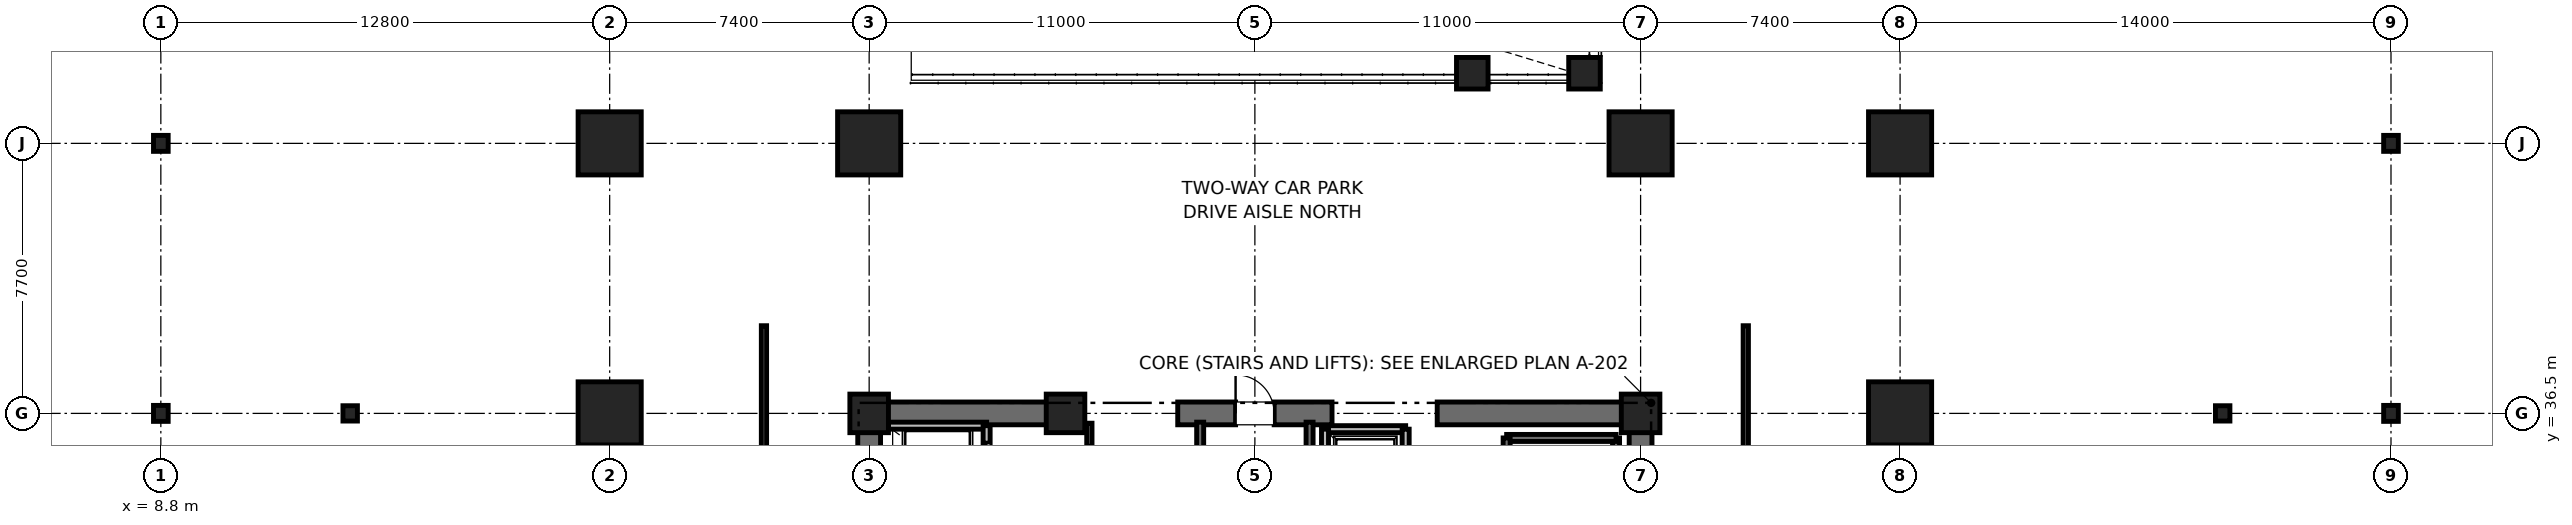
"""IFC4 building model, lengths in metres.
Left out: names, types, materials, properties, quantities, classifications, styles, units other than length and angle.
Written with IfcOpenShell. Run it as: python <this file> out.ifc"""

import sys

from ifc_helpers import new_model, si_unit, direction, frame, frame_2d, origin, origin_2d, place, context, subcontext, project, spatial, rectangle, i_section, extrude, element, fill, save


model = new_model("IFC4")
c1 = context("Model", 3, precision=1e-05, world=origin(), true_north=direction((0.0, 1.0)))
c2 = subcontext(c1, "Body", "Model", "MODEL_VIEW")
j1 = project(units=[si_unit("LENGTHUNIT", "METRE"), si_unit("PLANEANGLEUNIT", "RADIAN")], contexts=[c1])
p1 = place(None, origin())
s1 = spatial("IfcSite", under=j1, at=p1, CompositionType="ELEMENT")
p2 = place(p1, origin())
s2 = spatial("IfcBuilding", under=s1, at=p2, CompositionType="ELEMENT")
p3 = place(p2, frame((0.0, 0.0, -4.5)))
s3 = spatial("IfcBuildingStorey", under=s2, at=p3, CompositionType="ELEMENT", Elevation=-4.5)
for number, where, z_axis, x_axis in (
    (1, (29.0, 44.2, 0.0), (0.0, 0.0, 1.0), (1.0, 0.0, 0.0)),
    (2, (51.0, 44.2, 0.0), (0.0, 0.0, 1.0), (1.0, 0.0, 0.0)),
    (3, (21.6, 36.5, 0.0), (0.0, 0.0, 1.0), (1.0, 0.0, 0.0)),
    (4, (58.4, 36.5, 0.0), (0.0, 0.0, 1.0), (1.0, 0.0, 0.0)),
    (5, (21.6, 44.2, 0.0), (0.0, 0.0, 1.0), (1.0, 0.0, 0.0)),
    (6, (58.4, 44.2, 0.0), (0.0, 0.0, 1.0), (1.0, 0.0, 0.0)),
):
    element("IfcColumn", number, at=place(p3, frame(where, z_axis=z_axis, x_axis=x_axis)), inside=s3, PredefinedType="COLUMN", context=c2, shape_type="SweptSolid", body=[
        extrude(rectangle(XDim=1.8, YDim=1.8, at=origin_2d()), origin(), (0.0, 0.0, 1.0), 4.5),
    ])
for number, where, z_axis, x_axis in (
    (7, (14.2, 36.5, 0.0), (0.0, 0.0, 1.0), (1.0, 0.0, 0.0)),
    (8, (67.6, 36.5, 0.0), (0.0, 0.0, 1.0), (1.0, 0.0, 0.0)),
):
    element("IfcColumn", number, at=place(p3, frame(where, z_axis=z_axis, x_axis=x_axis)), inside=s3, PredefinedType="COLUMN", context=c2, shape_type="SweptSolid", body=[
        extrude(i_section(OverallWidth=0.412, OverallDepth=0.437, WebThickness=0.036, FlangeThickness=0.058, FilletRadius=0.015, at=origin_2d()), origin(), (0.0, 0.0, 1.0), 4.5),
    ])
for number, where, z_axis, x_axis in (
    (9, (29.0, 36.5, 0.0), (0.0, 0.0, 1.0), (1.0, 0.0, 0.0)),
    (10, (51.0, 36.5, 0.0), (0.0, 0.0, 1.0), (1.0, 0.0, 0.0)),
    (11, (34.6, 36.5, 0.0), (0.0, 0.0, 1.0), (1.0, 0.0, 0.0)),
):
    element("IfcColumn", number, at=place(p3, frame(where, z_axis=z_axis, x_axis=x_axis)), inside=s3, PredefinedType="PILASTER", context=c2, shape_type="SweptSolid", body=[
        extrude(rectangle(XDim=1.1, YDim=1.1, at=origin_2d()), origin(), (0.0, 0.0, 1.0), 4.5),
    ])
for number, where, z_axis, x_axis in (
    (12, (8.8, 36.5, 0.0), (0.0, 0.0, 1.0), (1.0, 0.0, 0.0)),
    (13, (8.8, 44.2, 0.0), (0.0, 0.0, 1.0), (1.0, 0.0, 0.0)),
    (14, (72.4, 36.5, 0.0), (0.0, 0.0, 1.0), (1.0, 0.0, 0.0)),
    (15, (72.4, 44.2, 0.0), (0.0, 0.0, 1.0), (1.0, 0.0, 0.0)),
):
    element("IfcColumn", number, at=place(p3, frame(where, z_axis=z_axis, x_axis=x_axis)), inside=s3, PredefinedType="COLUMN", context=c2, shape_type="SweptSolid", body=[
        extrude(i_section(OverallWidth=0.418, OverallDepth=0.456, WebThickness=0.042, FlangeThickness=0.067, FilletRadius=0.015, at=origin_2d()), origin(), (0.0, 0.0, 1.0), 4.5),
    ])
p4 = place(p3, frame((29.0, 36.5, 0.0), z_axis=(0.0, 0.0, 1.0), x_axis=(1.0, 0.0, 0.0)))
e16 = element("IfcWall", 16, at=p4, inside=s3, PredefinedType="SHEAR", context=c2, shape_type="SweptSolid", body=[
    extrude(rectangle(XDim=5.8, YDim=0.65, at=frame_2d((2.9, 0.0))), origin(), (0.0, 0.0, 1.0), 4.22),
])
p5 = place(p3, frame((37.8, 36.5, 0.0), z_axis=(0.0, 0.0, 1.0), x_axis=(1.0, 0.0, 0.0)))
e17 = element("IfcWall", 17, at=p5, inside=s3, PredefinedType="SHEAR", context=c2, shape_type="SweptSolid", body=[
    extrude(rectangle(XDim=4.4, YDim=0.65, at=frame_2d((2.2, 0.0))), origin(), (0.0, 0.0, 1.0), 4.22),
])
p6 = place(p5, frame((1.65, 0.0, 0.0)))
e18 = element("IfcOpeningElement", 18, at=p6, cuts=e17, PredefinedType="OPENING", context=c2, shape_type="SweptSolid", body=[
    extrude(rectangle(XDim=1.1, YDim=2.15, at=frame_2d((0.55, 1.075))), frame((0.0, 0.325, 0.0), z_axis=(0.0, -1.0, 0.0), x_axis=(1.0, 0.0, 0.0)), (0.0, 0.0, 1.0), 0.65),
])
for number, where, z_axis, x_axis in (
    (19, (45.2, 36.5, 0.0), (0.0, 0.0, 1.0), (1.0, 0.0, 0.0)),
    (20, (29.0, 30.7, 0.0), (0.0, 0.0, 1.0), (0.0, 1.0, 0.0)),
):
    element("IfcWall", number, at=place(p3, frame(where, z_axis=z_axis, x_axis=x_axis)), inside=s3, PredefinedType="SHEAR", context=c2, shape_type="SweptSolid", body=[
        extrude(rectangle(XDim=5.8, YDim=0.65, at=frame_2d((2.9, 0.0))), origin(), (0.0, 0.0, 1.0), 4.22),
    ])
p7 = place(p3, frame((51.0, 27.7, 0.0), z_axis=(0.0, 0.0, 1.0), x_axis=(0.0, 1.0, 0.0)))
e21 = element("IfcWall", 21, at=p7, inside=s3, PredefinedType="SHEAR", context=c2, shape_type="SweptSolid", body=[
    extrude(rectangle(XDim=8.8, YDim=0.65, at=frame_2d((4.4, 0.0))), origin(), (0.0, 0.0, 1.0), 4.22),
])
for number, where, z_axis, x_axis in (
    (22, (46.2, 46.2, -2.25), (0.0, 0.0, 1.0), (1.0, 0.0, 0.0)),
    (23, (49.4, 46.2, -2.25), (0.0, 0.0, 1.0), (1.0, 0.0, 0.0)),
):
    element("IfcColumn", number, at=place(p3, frame(where, z_axis=z_axis, x_axis=x_axis)), inside=s3, PredefinedType="COLUMN", context=c2, shape_type="SweptSolid", body=[
        extrude(rectangle(XDim=0.9, YDim=0.9, at=origin_2d()), origin(), (0.0, 0.0, 1.0), 4.5),
    ])
p8 = place(p3, frame((50.3, 27.65, 0.0), z_axis=(0.0, 0.0, 1.0), x_axis=(0.0, 1.0, 0.0)))
e24 = element("IfcWall", 24, at=p8, inside=s3, PredefinedType="SOLIDWALL", context=c2, shape_type="SweptSolid", body=[
    extrude(rectangle(XDim=8.15, YDim=0.2, at=frame_2d((4.075, 0.0))), origin(), (0.0, 0.0, 1.0), 4.22),
])
p9 = place(p3, frame((47.18, 35.8, 0.0), z_axis=(0.0, 0.0, 1.0), x_axis=(1.0, 0.0, 0.0)))
e25 = element("IfcWall", 25, at=p9, inside=s3, PredefinedType="SOLIDWALL", context=c2, shape_type="SweptSolid", body=[
    extrude(rectangle(XDim=3.12, YDim=0.2, at=frame_2d((1.56, 0.0))), origin(), (0.0, 0.0, 1.0), 4.22),
])
p10 = place(p3, frame((47.18, 27.62, 0.0), z_axis=(0.0, 0.0, 1.0), x_axis=(0.0, 1.0, 0.0)))
e26 = element("IfcWall", 26, at=p10, inside=s3, PredefinedType="SOLIDWALL", context=c2, shape_type="SweptSolid", body=[
    extrude(rectangle(XDim=8.18, YDim=0.2, at=frame_2d((4.09, 0.0))), origin(), (0.0, 0.0, 1.0), 4.22),
])
p11 = place(p3, frame((38.44, 27.38, 0.0), z_axis=(0.0, 0.0, 1.0), x_axis=(0.0, 1.0, 0.0)))
e27 = element("IfcWall", 27, at=p11, inside=s3, PredefinedType="SOLIDWALL", context=c2, shape_type="SweptSolid", body=[
    extrude(rectangle(XDim=8.87, YDim=0.2, at=frame_2d((4.435, 0.0))), origin(), (0.0, 0.0, 1.0), 4.22),
])
p12 = place(p3, frame((41.56, 27.68, 0.0), z_axis=(0.0, 0.0, 1.0), x_axis=(0.0, 1.0, 0.0)))
e28 = element("IfcWall", 28, at=p12, inside=s3, PredefinedType="SOLIDWALL", context=c2, shape_type="SweptSolid", body=[
    extrude(rectangle(XDim=8.57, YDim=0.2, at=frame_2d((4.285, 0.0))), origin(), (0.0, 0.0, 1.0), 4.22),
])
p13 = place(p3, frame((32.35, 36.15, 0.0), z_axis=(0.0, 0.0, 1.0), x_axis=(-1.0, 0.0, 0.0)))
e29 = element("IfcWall", 29, at=p13, inside=s3, PredefinedType="SOLIDWALL", context=c2, shape_type="SweptSolid", body=[
    extrude(rectangle(XDim=2.8, YDim=0.2, at=frame_2d((1.4, 0.0))), origin(), (0.0, 0.0, 1.0), 3.4),
])
p14 = place(p3, frame((32.35, 34.05, 0.0), z_axis=(0.0, 0.0, 1.0), x_axis=(0.0, 1.0, 0.0)))
e30 = element("IfcWall", 30, at=p14, inside=s3, PredefinedType="SOLIDWALL", context=c2, shape_type="SweptSolid", body=[
    extrude(rectangle(XDim=2.1, YDim=0.2, at=frame_2d((1.05, 0.0))), origin(), (0.0, 0.0, 1.0), 4.22),
])
p15 = place(p14, frame((0.5, 0.0, 0.0)))
e31 = element("IfcOpeningElement", 31, at=p15, cuts=e30, PredefinedType="OPENING", context=c2, shape_type="SweptSolid", body=[
    extrude(rectangle(XDim=1.1, YDim=2.2, at=frame_2d((0.55, 1.1))), frame((0.0, 0.1, 0.0), z_axis=(0.0, -1.0, 0.0), x_axis=(1.0, 0.0, 0.0)), (0.0, 0.0, 1.0), 0.2),
])
p16 = place(p3, frame((44.3, 36.05, 0.0), z_axis=(0.0, 0.0, 1.0), x_axis=(-1.0, 0.0, 0.0)))
e32 = element("IfcWall", 32, at=p16, inside=s3, PredefinedType="SOLIDWALL", context=c2, shape_type="SweptSolid", body=[
    extrude(rectangle(XDim=2.3, YDim=0.2, at=frame_2d((1.15, 0.0))), origin(), (0.0, 0.0, 1.0), 3.0),
])
for number, where, z_axis, x_axis in (
    (33, (42.0, 36.05, 0.0), (0.0, 0.0, 1.0), (0.0, -1.0, 0.0)),
    (34, (44.3, 33.45, 0.0), (0.0, 0.0, 1.0), (0.0, 1.0, 0.0)),
):
    element("IfcWall", number, at=place(p3, frame(where, z_axis=z_axis, x_axis=x_axis)), inside=s3, PredefinedType="SOLIDWALL", context=c2, shape_type="SweptSolid", body=[
        extrude(rectangle(XDim=2.6, YDim=0.2, at=frame_2d((1.3, 0.0))), origin(), (0.0, 0.0, 1.0), 3.0),
    ])
p17 = place(p3, frame((35.28, 33.95, 0.0), z_axis=(0.0, 0.0, 1.0), x_axis=(0.0, 1.0, 0.0)))
e35 = element("IfcWall", 35, at=p17, inside=s3, PredefinedType="PARTITIONING", context=c2, shape_type="SweptSolid", body=[
    extrude(rectangle(XDim=2.27, YDim=0.15, at=frame_2d((1.135, 0.0))), origin(), (0.0, 0.0, 1.0), 2.85),
])
p18 = place(p17, frame((0.66, 0.0, 0.0)))
e36 = element("IfcOpeningElement", 36, at=p18, cuts=e35, PredefinedType="OPENING", context=c2, shape_type="SweptSolid", body=[
    extrude(rectangle(XDim=0.95, YDim=2.15, at=frame_2d((0.475, 1.075))), frame((0.0, 0.075, 0.0), z_axis=(0.0, -1.0, 0.0), x_axis=(1.0, 0.0, 0.0)), (0.0, 0.0, 1.0), 0.15),
])
p19 = place(p3, frame((26.0, 26.8, 0.0), z_axis=(0.0, 0.0, 1.0), x_axis=(0.0, 1.0, 0.0)))
e37 = element("IfcWall", 37, at=p19, inside=s3, PredefinedType="PARTITIONING", context=c2, shape_type="SweptSolid", body=[
    extrude(rectangle(XDim=12.2, YDim=0.15, at=frame_2d((6.1, 0.0))), origin(), (0.0, 0.0, 1.0), 2.85),
])
p20 = place(p19, frame((4.3, 0.0, 0.0)))
e38 = element("IfcOpeningElement", 38, at=p20, cuts=e37, PredefinedType="OPENING", context=c2, shape_type="SweptSolid", body=[
    extrude(rectangle(XDim=1.0, YDim=2.15, at=frame_2d((0.5, 1.075))), frame((0.0, 0.075, 0.0), z_axis=(0.0, -1.0, 0.0), x_axis=(1.0, 0.0, 0.0)), (0.0, 0.0, 1.0), 0.15),
])
p21 = place(p3, frame((54.0, 26.8, 0.0), z_axis=(0.0, 0.0, 1.0), x_axis=(0.0, 1.0, 0.0)))
e39 = element("IfcWall", 39, at=p21, inside=s3, PredefinedType="PARTITIONING", context=c2, shape_type="SweptSolid", body=[
    extrude(rectangle(XDim=12.2, YDim=0.15, at=frame_2d((6.1, 0.0))), origin(), (0.0, 0.0, 1.0), 2.85),
])
p22 = place(p21, frame((4.3, 0.0, 0.0)))
e40 = element("IfcOpeningElement", 40, at=p22, cuts=e39, PredefinedType="OPENING", context=c2, shape_type="SweptSolid", body=[
    extrude(rectangle(XDim=1.0, YDim=2.15, at=frame_2d((0.5, 1.075))), frame((0.0, 0.075, 0.0), z_axis=(0.0, -1.0, 0.0), x_axis=(1.0, 0.0, 0.0)), (0.0, 0.0, 1.0), 0.15),
])
p23 = place(p6, origin())
e41 = element("IfcDoor", 41, at=p23, inside=s3, OperationType="SINGLE_SWING_LEFT", PredefinedType="DOOR", context=c2, shape_type="SweptSolid", body=[
    extrude(rectangle(XDim=1.1, YDim=2.15, at=frame_2d((0.55, 1.075))), frame((0.0, 0.025, 0.0), z_axis=(0.0, -1.0, 0.0), x_axis=(1.0, 0.0, 0.0)), (0.0, 0.0, 1.0), 0.05),
])
fill(e18, e41)
p24 = place(p15, origin())
e42 = element("IfcDoor", 42, at=p24, inside=s3, OperationType="SLIDING_TO_RIGHT", PredefinedType="DOOR", context=c2, shape_type="SweptSolid", body=[
    extrude(rectangle(XDim=1.1, YDim=2.2, at=frame_2d((0.55, 1.1))), frame((0.0, 0.025, 0.0), z_axis=(0.0, -1.0, 0.0), x_axis=(1.0, 0.0, 0.0)), (0.0, 0.0, 1.0), 0.05),
])
fill(e31, e42)
save(model, sys.argv[1])
